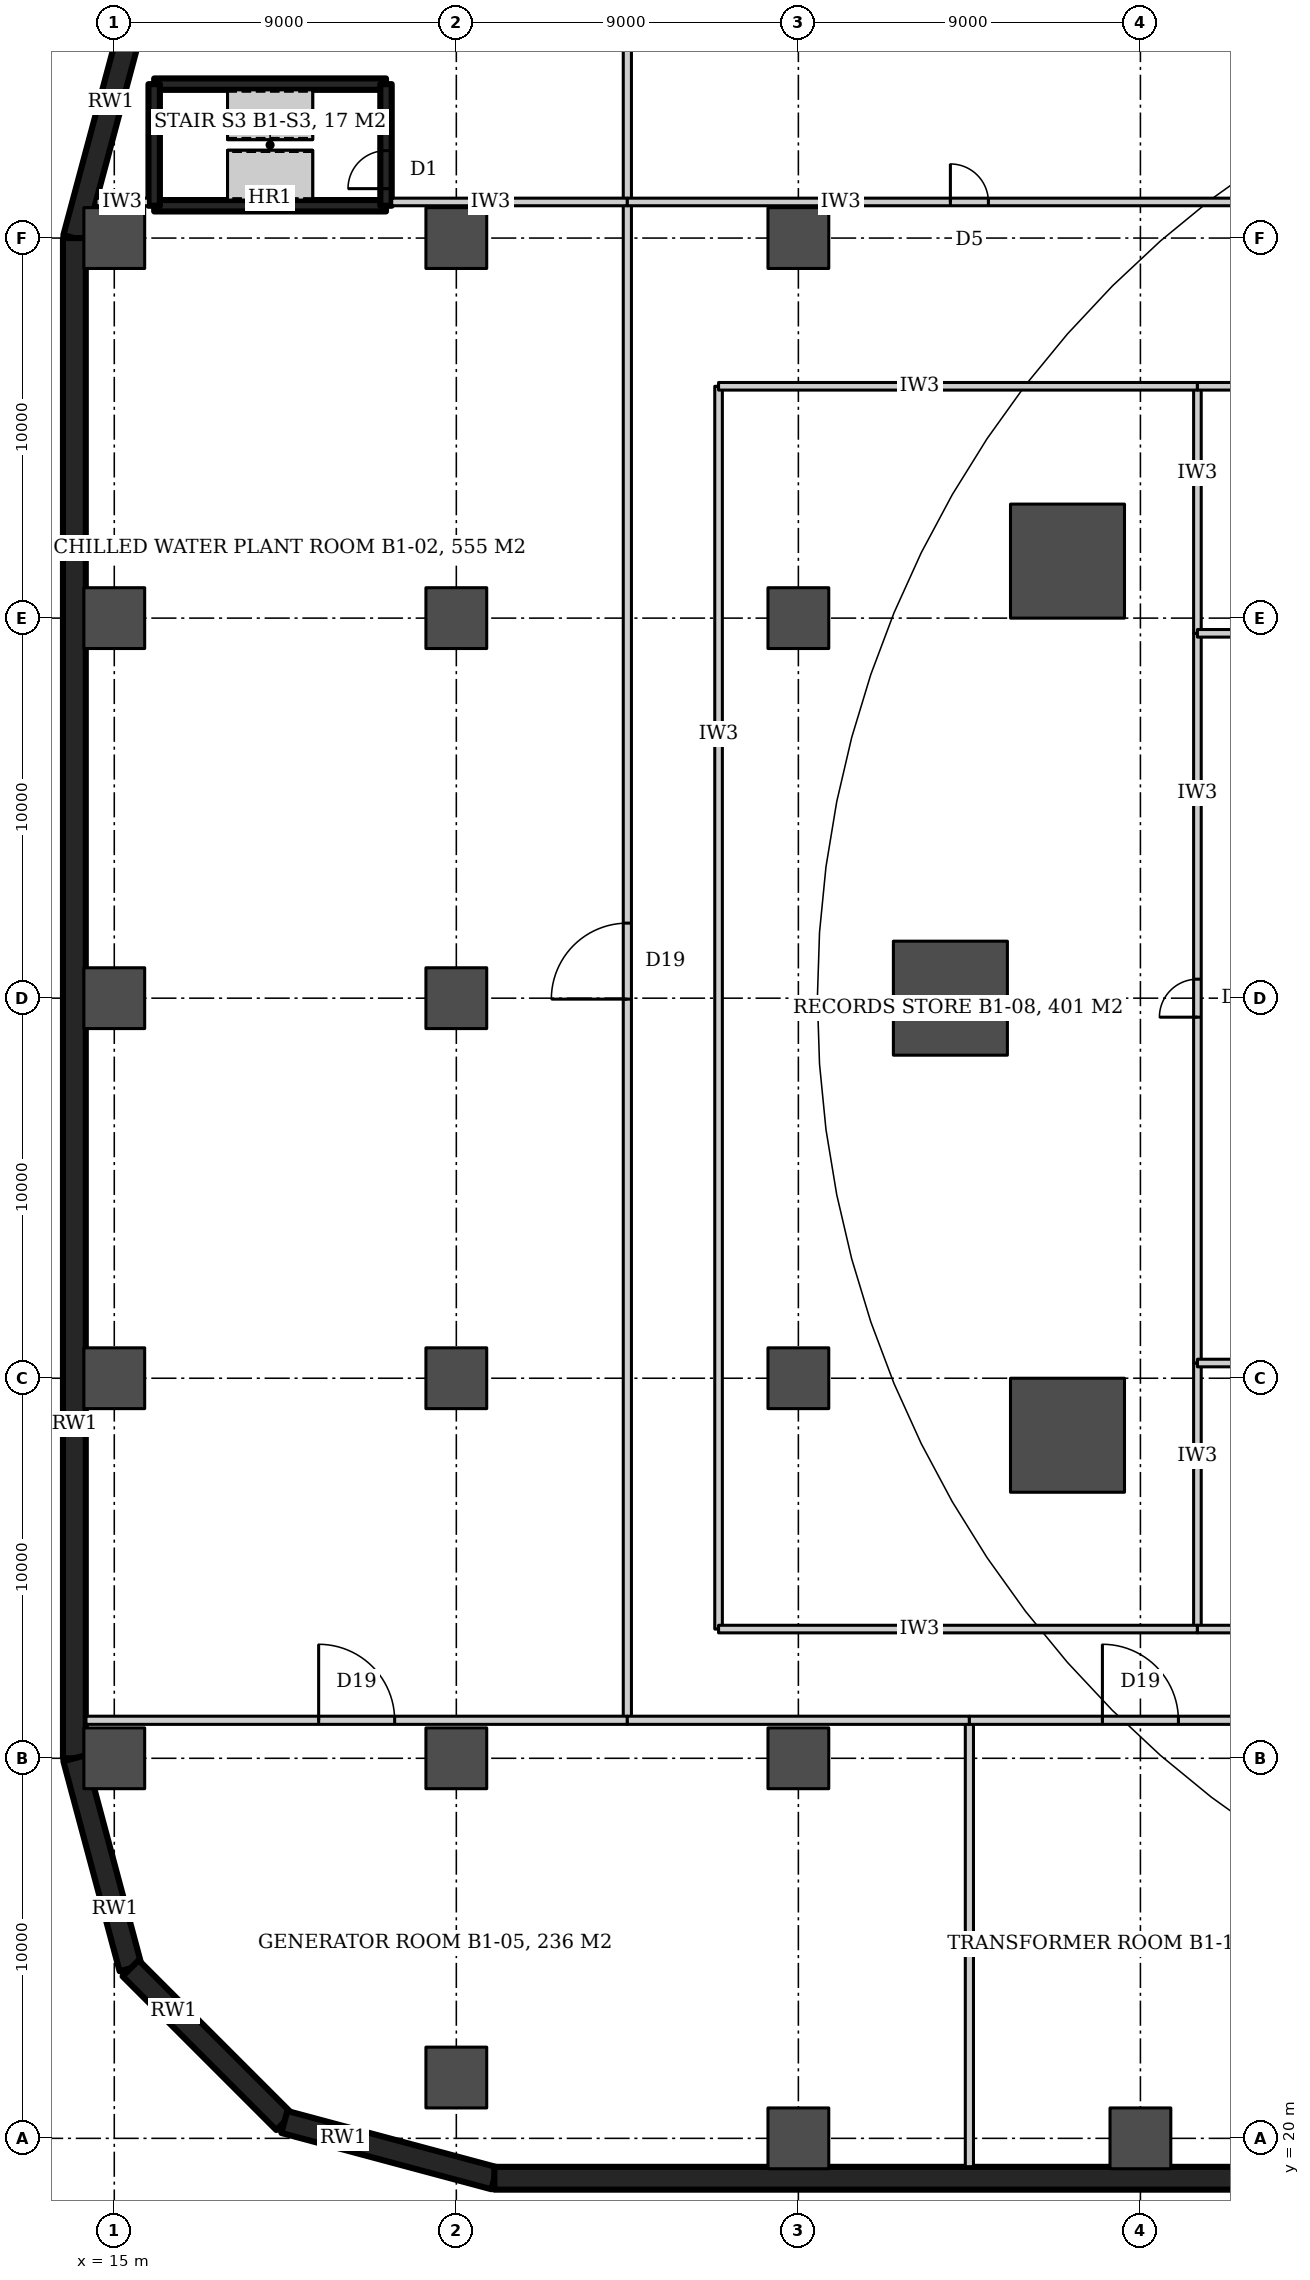
"""IFC4 building model, lengths in metres.
Left out: names, types, materials, properties, quantities, classifications, styles, units other than length and angle.
Written with IfcOpenShell. Run it as: python <this file> out.ifc"""

import sys

from ifc_helpers import new_model, si_unit, direction, frame, frame_2d, origin, origin_2d, place, context, subcontext, project, spatial, rectangle, circle, extrude, element, fill, save


model = new_model("IFC4")
c1 = context("Model", 3, precision=1e-05, world=origin(), true_north=direction((0.0, 1.0)))
c2 = subcontext(c1, "Body", "Model", "MODEL_VIEW")
j1 = project(units=[si_unit("LENGTHUNIT", "METRE"), si_unit("PLANEANGLEUNIT", "RADIAN")], contexts=[c1])
p1 = place(None, origin())
s1 = spatial("IfcSite", under=j1, at=p1, CompositionType="ELEMENT")
p2 = place(p1, origin())
s2 = spatial("IfcBuilding", under=s1, at=p2, CompositionType="ELEMENT")
p3 = place(p2, frame((0.0, 0.0, -6.0)))
s3 = spatial("IfcBuildingStorey", under=s2, at=p3, CompositionType="ELEMENT", Elevation=-6.0)
p4 = place(p3, frame((15.43, 75.525, -0.5), z_axis=(0.0, 0.0, 1.0), x_axis=(-0.258831381584, -0.965922520654, 0.0)))
e1 = element("IfcWall", 1, at=p4, inside=s3, PredefinedType="SOLIDWALL", context=c2, shape_type="SweptSolid", body=[
    extrude(rectangle(XDim=5.72, YDim=0.6, at=frame_2d((2.86, 0.0))), origin(), (0.0, 0.0, 1.0), 6.2),
])
p5 = place(p3, frame((13.95, 70.0, -0.5), z_axis=(0.0, 0.0, 1.0), x_axis=(0.0, -1.0, 0.0)))
e2 = element("IfcWall", 2, at=p5, inside=s3, PredefinedType="SOLIDWALL", context=c2, shape_type="SweptSolid", body=[
    extrude(rectangle(XDim=40.0, YDim=0.6, at=frame_2d((20.0, 0.0))), origin(), (0.0, 0.0, 1.0), 6.2),
])
p6 = place(p3, frame((13.95, 30.0, -0.5), z_axis=(0.0, 0.0, 1.0), x_axis=(0.258831381584, -0.965922520654, 0.0)))
e3 = element("IfcWall", 3, at=p6, inside=s3, PredefinedType="SOLIDWALL", context=c2, shape_type="SweptSolid", body=[
    extrude(rectangle(XDim=5.72, YDim=0.6, at=frame_2d((2.86, 0.0))), origin(), (0.0, 0.0, 1.0), 6.2),
])
p7 = place(p3, frame((15.43, 24.475, -0.5), z_axis=(0.0, 0.0, 1.0), x_axis=(0.707106781187, -0.707106781187, 0.0)))
e4 = element("IfcWall", 4, at=p7, inside=s3, PredefinedType="SOLIDWALL", context=c2, shape_type="SweptSolid", body=[
    extrude(rectangle(XDim=5.72, YDim=0.6, at=frame_2d((2.86, 0.0))), origin(), (0.0, 0.0, 1.0), 6.2),
])
p8 = place(p3, frame((19.475, 20.43, -0.5), z_axis=(0.0, 0.0, 1.0), x_axis=(0.965922520654, -0.258831381584, 0.0)))
e5 = element("IfcWall", 5, at=p8, inside=s3, PredefinedType="SOLIDWALL", context=c2, shape_type="SweptSolid", body=[
    extrude(rectangle(XDim=5.72, YDim=0.6, at=frame_2d((2.86, 0.0))), origin(), (0.0, 0.0, 1.0), 6.2),
])
p9 = place(p3, frame((25.0, 18.95, -0.5), z_axis=(0.0, 0.0, 1.0), x_axis=(1.0, 0.0, 0.0)))
e6 = element("IfcWall", 6, at=p9, inside=s3, PredefinedType="SOLIDWALL", context=c2, shape_type="SweptSolid", body=[
    extrude(rectangle(XDim=70.0, YDim=0.6, at=frame_2d((35.0, 0.0))), origin(), (0.0, 0.0, 1.0), 6.2),
])
for number, where, z_axis, x_axis in (
    (7, (33.0, 20.0, -0.5), (0.0, 0.0, 1.0), (1.0, 0.0, 0.0)),
    (8, (42.0, 20.0, -0.5), (0.0, 0.0, 1.0), (1.0, 0.0, 0.0)),
    (9, (24.0, 21.6, -0.5), (0.0, 0.0, 1.0), (1.0, 0.0, 0.0)),
    (10, (15.0, 30.0, -0.5), (0.0, 0.0, 1.0), (1.0, 0.0, 0.0)),
    (11, (24.0, 30.0, -0.5), (0.0, 0.0, 1.0), (1.0, 0.0, 0.0)),
    (12, (33.0, 30.0, -0.5), (0.0, 0.0, 1.0), (1.0, 0.0, 0.0)),
    (13, (15.0, 40.0, -0.5), (0.0, 0.0, 1.0), (1.0, 0.0, 0.0)),
    (14, (24.0, 40.0, -0.5), (0.0, 0.0, 1.0), (1.0, 0.0, 0.0)),
    (15, (33.0, 40.0, -0.5), (0.0, 0.0, 1.0), (1.0, 0.0, 0.0)),
    (16, (15.0, 50.0, -0.5), (0.0, 0.0, 1.0), (1.0, 0.0, 0.0)),
    (17, (24.0, 50.0, -0.5), (0.0, 0.0, 1.0), (1.0, 0.0, 0.0)),
    (18, (15.0, 60.0, -0.5), (0.0, 0.0, 1.0), (1.0, 0.0, 0.0)),
    (19, (24.0, 60.0, -0.5), (0.0, 0.0, 1.0), (1.0, 0.0, 0.0)),
    (20, (33.0, 60.0, -0.5), (0.0, 0.0, 1.0), (1.0, 0.0, 0.0)),
    (21, (15.0, 70.0, -0.5), (0.0, 0.0, 1.0), (1.0, 0.0, 0.0)),
    (22, (24.0, 70.0, -0.5), (0.0, 0.0, 1.0), (1.0, 0.0, 0.0)),
    (23, (33.0, 70.0, -0.5), (0.0, 0.0, 1.0), (1.0, 0.0, 0.0)),
):
    element("IfcColumn", number, at=place(p3, frame(where, z_axis=z_axis, x_axis=x_axis)), inside=s3, PredefinedType="COLUMN", context=c2, shape_type="SweptSolid", body=[
        extrude(rectangle(XDim=1.6, YDim=1.6, at=origin_2d()), origin(), (0.0, 0.0, 1.0), 6.5),
    ])
for number, where, z_axis, x_axis in (
    (24, (40.081, 61.5, 0.0), (0.0, 0.0, 1.0), (1.0, 0.0, 0.0)),
    (25, (37.0, 50.0, 0.0), (0.0, 0.0, 1.0), (1.0, 0.0, 0.0)),
    (26, (40.081, 38.5, 0.0), (0.0, 0.0, 1.0), (1.0, 0.0, 0.0)),
):
    element("IfcColumn", number, at=place(p3, frame(where, z_axis=z_axis, x_axis=x_axis)), inside=s3, PredefinedType="COLUMN", context=c2, shape_type="SweptSolid", body=[
        extrude(circle(Radius=1.5, at=origin_2d()), origin(), (0.0, 0.0, 1.0), 6.0),
    ])
p10 = place(p3, frame((28.5, 31.0, 0.0), z_axis=(0.0, 0.0, 1.0), x_axis=(0.0, 1.0, 0.0)))
e27 = element("IfcWall", 27, at=p10, inside=s3, PredefinedType="PARTITIONING", context=c2, shape_type="SweptSolid", body=[
    extrude(rectangle(XDim=39.95, YDim=0.215, at=frame_2d((19.975, 0.0))), origin(), (0.0, 0.0, 1.0), 3.68),
])
p11 = place(p10, frame((18.975, 0.0, 0.0)))
e28 = element("IfcOpeningElement", 28, at=p11, cuts=e27, PredefinedType="OPENING", context=c2, shape_type="SweptSolid", body=[
    extrude(rectangle(XDim=2.0, YDim=2.4, at=frame_2d((1.0, 1.2))), frame((0.0, 0.117, 0.0), z_axis=(0.0, -1.0, 0.0), x_axis=(1.0, 0.0, 0.0)), (0.0, 0.0, 1.0), 0.235),
])
p12 = place(p3, frame((28.5, 70.95, 0.0), z_axis=(0.0, 0.0, 1.0), x_axis=(0.0, 1.0, 0.0)))
e29 = element("IfcWall", 29, at=p12, inside=s3, PredefinedType="PARTITIONING", context=c2, shape_type="SweptSolid", body=[
    extrude(rectangle(XDim=9.795, YDim=0.215, at=frame_2d((4.897, 0.0))), origin(), (0.0, 0.0, 1.0), 3.68),
])
p13 = place(p3, frame((30.9, 33.4, 0.0), z_axis=(0.0, 0.0, 1.0), x_axis=(0.0, 1.0, 0.0)))
e30 = element("IfcWall", 30, at=p13, inside=s3, PredefinedType="PARTITIONING", context=c2, shape_type="SweptSolid", body=[
    extrude(rectangle(XDim=32.7, YDim=0.2, at=frame_2d((16.35, 0.0))), origin(), (0.0, 0.0, 1.0), 3.68),
])
p14 = place(p3, frame((37.5, 19.255, 0.0), z_axis=(0.0, 0.0, 1.0), x_axis=(0.0, 1.0, 0.0)))
e31 = element("IfcWall", 31, at=p14, inside=s3, PredefinedType="PARTITIONING", context=c2, shape_type="SweptSolid", body=[
    extrude(rectangle(XDim=11.745, YDim=0.215, at=frame_2d((5.873, 0.0))), origin(), (0.0, 0.0, 1.0), 3.68),
])
p15 = place(p3, frame((43.5, 33.4, 0.0), z_axis=(0.0, 0.0, 1.0), x_axis=(0.0, 1.0, 0.0)))
e32 = element("IfcWall", 32, at=p15, inside=s3, PredefinedType="PARTITIONING", context=c2, shape_type="SweptSolid", body=[
    extrude(rectangle(XDim=7.0, YDim=0.2, at=frame_2d((3.5, 0.0))), origin(), (0.0, 0.0, 1.0), 3.08),
])
p16 = place(p3, frame((43.5, 40.4, 0.0), z_axis=(0.0, 0.0, 1.0), x_axis=(0.0, 1.0, 0.0)))
e33 = element("IfcWall", 33, at=p16, inside=s3, PredefinedType="PARTITIONING", context=c2, shape_type="SweptSolid", body=[
    extrude(rectangle(XDim=19.2, YDim=0.2, at=frame_2d((9.6, 0.0))), origin(), (0.0, 0.0, 1.0), 3.08),
])
p17 = place(p16, frame((9.1, 0.0, 0.0)))
e34 = element("IfcOpeningElement", 34, at=p17, cuts=e33, PredefinedType="OPENING", context=c2, shape_type="SweptSolid", body=[
    extrude(rectangle(XDim=1.0, YDim=2.1, at=frame_2d((0.5, 1.05))), frame((0.0, 0.11, 0.0), z_axis=(0.0, -1.0, 0.0), x_axis=(1.0, 0.0, 0.0)), (0.0, 0.0, 1.0), 0.22),
])
p18 = place(p3, frame((43.5, 59.6, 0.0), z_axis=(0.0, 0.0, 1.0), x_axis=(0.0, 1.0, 0.0)))
e35 = element("IfcWall", 35, at=p18, inside=s3, PredefinedType="PARTITIONING", context=c2, shape_type="SweptSolid", body=[
    extrude(rectangle(XDim=6.5, YDim=0.2, at=frame_2d((3.25, 0.0))), origin(), (0.0, 0.0, 1.0), 3.08),
])
p19 = place(p3, frame((14.255, 31.0, 0.0), z_axis=(0.0, 0.0, 1.0), x_axis=(1.0, 0.0, 0.0)))
e36 = element("IfcWall", 36, at=p19, inside=s3, PredefinedType="PARTITIONING", context=c2, shape_type="SweptSolid", body=[
    extrude(rectangle(XDim=14.245, YDim=0.215, at=frame_2d((7.123, 0.0))), origin(), (0.0, 0.0, 1.0), 3.68),
])
p20 = place(p19, frame((6.123, 0.0, 0.0)))
e37 = element("IfcOpeningElement", 37, at=p20, cuts=e36, PredefinedType="OPENING", context=c2, shape_type="SweptSolid", body=[
    extrude(rectangle(XDim=2.0, YDim=2.4, at=frame_2d((1.0, 1.2))), frame((0.0, 0.117, 0.0), z_axis=(0.0, -1.0, 0.0), x_axis=(1.0, 0.0, 0.0)), (0.0, 0.0, 1.0), 0.235),
])
p21 = place(p3, frame((28.5, 31.0, 0.0), z_axis=(0.0, 0.0, 1.0), x_axis=(1.0, 0.0, 0.0)))
e38 = element("IfcWall", 38, at=p21, inside=s3, PredefinedType="PARTITIONING", context=c2, shape_type="SweptSolid", body=[
    extrude(rectangle(XDim=9.0, YDim=0.215, at=frame_2d((4.5, 0.0))), origin(), (0.0, 0.0, 1.0), 3.68),
])
p22 = place(p3, frame((37.5, 31.0, 0.0), z_axis=(0.0, 0.0, 1.0), x_axis=(1.0, 0.0, 0.0)))
e39 = element("IfcWall", 39, at=p22, inside=s3, PredefinedType="PARTITIONING", context=c2, shape_type="SweptSolid", body=[
    extrude(rectangle(XDim=9.0, YDim=0.215, at=frame_2d((4.5, 0.0))), origin(), (0.0, 0.0, 1.0), 3.68),
])
p23 = place(p22, frame((3.5, 0.0, 0.0)))
e40 = element("IfcOpeningElement", 40, at=p23, cuts=e39, PredefinedType="OPENING", context=c2, shape_type="SweptSolid", body=[
    extrude(rectangle(XDim=2.0, YDim=2.4, at=frame_2d((1.0, 1.2))), frame((0.0, 0.117, 0.0), z_axis=(0.0, -1.0, 0.0), x_axis=(1.0, 0.0, 0.0)), (0.0, 0.0, 1.0), 0.235),
])
p24 = place(p3, frame((30.9, 33.4, 0.0), z_axis=(0.0, 0.0, 1.0), x_axis=(1.0, 0.0, 0.0)))
e41 = element("IfcWall", 41, at=p24, inside=s3, PredefinedType="PARTITIONING", context=c2, shape_type="SweptSolid", body=[
    extrude(rectangle(XDim=12.6, YDim=0.2, at=frame_2d((6.3, 0.0))), origin(), (0.0, 0.0, 1.0), 3.68),
])
p25 = place(p3, frame((43.5, 33.4, 0.0), z_axis=(0.0, 0.0, 1.0), x_axis=(1.0, 0.0, 0.0)))
e42 = element("IfcWall", 42, at=p25, inside=s3, PredefinedType="PARTITIONING", context=c2, shape_type="SweptSolid", body=[
    extrude(rectangle(XDim=18.55, YDim=0.2, at=frame_2d((9.275, 0.0))), origin(), (0.0, 0.0, 1.0), 3.08),
])
p26 = place(p25, frame((8.775, 0.0, 0.0)))
e43 = element("IfcOpeningElement", 43, at=p26, cuts=e42, PredefinedType="OPENING", context=c2, shape_type="SweptSolid", body=[
    extrude(rectangle(XDim=1.0, YDim=2.1, at=frame_2d((0.5, 1.05))), frame((0.0, 0.11, 0.0), z_axis=(0.0, -1.0, 0.0), x_axis=(1.0, 0.0, 0.0)), (0.0, 0.0, 1.0), 0.22),
])
for number, where, z_axis, x_axis in (
    (44, (43.5, 40.4, 0.0), (0.0, 0.0, 1.0), (1.0, 0.0, 0.0)),
    (45, (43.5, 59.6, 0.0), (0.0, 0.0, 1.0), (1.0, 0.0, 0.0)),
):
    element("IfcWall", number, at=place(p3, frame(where, z_axis=z_axis, x_axis=x_axis)), inside=s3, PredefinedType="PARTITIONING", context=c2, shape_type="SweptSolid", body=[
        extrude(rectangle(XDim=18.55, YDim=0.2, at=frame_2d((9.275, 0.0))), origin(), (0.0, 0.0, 1.0), 2.48),
    ])
p27 = place(p3, frame((30.9, 66.1, 0.0), z_axis=(0.0, 0.0, 1.0), x_axis=(1.0, 0.0, 0.0)))
e46 = element("IfcWall", 46, at=p27, inside=s3, PredefinedType="PARTITIONING", context=c2, shape_type="SweptSolid", body=[
    extrude(rectangle(XDim=12.6, YDim=0.2, at=frame_2d((6.3, 0.0))), origin(), (0.0, 0.0, 1.0), 3.68),
])
p28 = place(p3, frame((43.5, 66.1, 0.0), z_axis=(0.0, 0.0, 1.0), x_axis=(1.0, 0.0, 0.0)))
e47 = element("IfcWall", 47, at=p28, inside=s3, PredefinedType="PARTITIONING", context=c2, shape_type="SweptSolid", body=[
    extrude(rectangle(XDim=18.55, YDim=0.2, at=frame_2d((9.275, 0.0))), origin(), (0.0, 0.0, 1.0), 3.08),
])
p29 = place(p28, frame((8.075, 0.0, 0.0)))
e48 = element("IfcOpeningElement", 48, at=p29, cuts=e47, PredefinedType="OPENING", context=c2, shape_type="SweptSolid", body=[
    extrude(rectangle(XDim=2.4, YDim=2.7, at=frame_2d((1.2, 1.35))), frame((0.0, 0.11, 0.0), z_axis=(0.0, -1.0, 0.0), x_axis=(1.0, 0.0, 0.0)), (0.0, 0.0, 1.0), 0.22),
])
p30 = place(p3, frame((14.52, 70.95, 0.0), z_axis=(0.0, 0.0, 1.0), x_axis=(1.0, 0.0, 0.0)))
e49 = element("IfcWall", 49, at=p30, inside=s3, PredefinedType="PARTITIONING", context=c2, shape_type="SweptSolid", body=[
    extrude(rectangle(XDim=1.38, YDim=0.2, at=frame_2d((0.69, 0.0))), origin(), (0.0, 0.0, 1.0), 4.1),
])
p31 = place(p3, frame((22.3, 70.95, 0.0), z_axis=(0.0, 0.0, 1.0), x_axis=(1.0, 0.0, 0.0)))
e50 = element("IfcWall", 50, at=p31, inside=s3, PredefinedType="PARTITIONING", context=c2, shape_type="SweptSolid", body=[
    extrude(rectangle(XDim=6.2, YDim=0.2, at=frame_2d((3.1, 0.0))), origin(), (0.0, 0.0, 1.0), 4.1),
])
p32 = place(p3, frame((28.5, 70.95, 0.0), z_axis=(0.0, 0.0, 1.0), x_axis=(1.0, 0.0, 0.0)))
e51 = element("IfcWall", 51, at=p32, inside=s3, PredefinedType="PARTITIONING", context=c2, shape_type="SweptSolid", body=[
    extrude(rectangle(XDim=18.0, YDim=0.2, at=frame_2d((9.0, 0.0))), origin(), (0.0, 0.0, 1.0), 3.68),
])
p33 = place(p32, frame((8.5, 0.0, 0.0)))
e52 = element("IfcOpeningElement", 52, at=p33, cuts=e51, PredefinedType="OPENING", context=c2, shape_type="SweptSolid", body=[
    extrude(rectangle(XDim=1.0, YDim=2.1, at=frame_2d((0.5, 1.05))), frame((0.0, 0.11, 0.0), z_axis=(0.0, -1.0, 0.0), x_axis=(1.0, 0.0, 0.0)), (0.0, 0.0, 1.0), 0.22),
])
for number, where, z_axis, x_axis in (
    (53, (16.05, 70.85, 0.0), (0.0, 0.0, 1.0), (1.0, 0.0, 0.0)),
    (54, (16.05, 74.05, 0.0), (0.0, 0.0, 1.0), (1.0, 0.0, 0.0)),
):
    element("IfcWall", number, at=place(p3, frame(where, z_axis=z_axis, x_axis=x_axis)), inside=s3, PredefinedType="SHEAR", context=c2, shape_type="SweptSolid", body=[
        extrude(rectangle(XDim=6.1, YDim=0.3, at=frame_2d((3.05, 0.0))), origin(), (0.0, 0.0, 1.0), 6.0),
    ])
p34 = place(p3, frame((16.05, 70.85, 0.0), z_axis=(0.0, 0.0, 1.0), x_axis=(0.0, 1.0, 0.0)))
e55 = element("IfcWall", 55, at=p34, inside=s3, PredefinedType="SHEAR", context=c2, shape_type="SweptSolid", body=[
    extrude(rectangle(XDim=3.2, YDim=0.3, at=frame_2d((1.6, 0.0))), origin(), (0.0, 0.0, 1.0), 6.0),
])
p35 = place(p3, frame((22.15, 70.85, 0.0), z_axis=(0.0, 0.0, 1.0), x_axis=(0.0, 1.0, 0.0)))
e56 = element("IfcWall", 56, at=p35, inside=s3, PredefinedType="SHEAR", context=c2, shape_type="SweptSolid", body=[
    extrude(rectangle(XDim=3.2, YDim=0.3, at=frame_2d((1.6, 0.0))), origin(), (0.0, 0.0, 1.0), 6.0),
])
p36 = place(p35, frame((0.45, 0.0, 0.0)))
e57 = element("IfcOpeningElement", 57, at=p36, cuts=e56, PredefinedType="OPENING", context=c2, shape_type="SweptSolid", body=[
    extrude(rectangle(XDim=1.0, YDim=2.1, at=frame_2d((0.5, 1.05))), frame((0.0, 0.16, 0.0), z_axis=(0.0, -1.0, 0.0), x_axis=(1.0, 0.0, 0.0)), (0.0, 0.0, 1.0), 0.32),
])
p37 = place(p20, origin())
e58 = element("IfcDoor", 58, at=p37, inside=s3, OperationType="DOUBLE_DOOR_DOUBLE_SWING", PredefinedType="DOOR", context=c2, shape_type="SweptSolid", body=[
    extrude(rectangle(XDim=2.0, YDim=2.4, at=frame_2d((1.0, 1.2))), frame((0.0, 0.025, 0.0), z_axis=(0.0, -1.0, 0.0), x_axis=(1.0, 0.0, 0.0)), (0.0, 0.0, 1.0), 0.05),
])
fill(e37, e58)
p38 = place(p23, origin())
e59 = element("IfcDoor", 59, at=p38, inside=s3, OperationType="DOUBLE_DOOR_DOUBLE_SWING", PredefinedType="DOOR", context=c2, shape_type="SweptSolid", body=[
    extrude(rectangle(XDim=2.0, YDim=2.4, at=frame_2d((1.0, 1.2))), frame((0.0, 0.025, 0.0), z_axis=(0.0, -1.0, 0.0), x_axis=(1.0, 0.0, 0.0)), (0.0, 0.0, 1.0), 0.05),
])
fill(e40, e59)
p39 = place(p11, origin())
e60 = element("IfcDoor", 60, at=p39, inside=s3, OperationType="DOUBLE_DOOR_DOUBLE_SWING", PredefinedType="DOOR", context=c2, shape_type="SweptSolid", body=[
    extrude(rectangle(XDim=2.0, YDim=2.4, at=frame_2d((1.0, 1.2))), frame((0.0, 0.025, 0.0), z_axis=(0.0, -1.0, 0.0), x_axis=(1.0, 0.0, 0.0)), (0.0, 0.0, 1.0), 0.05),
])
fill(e28, e60)
p40 = place(p33, origin())
e61 = element("IfcDoor", 61, at=p40, inside=s3, OperationType="SINGLE_SWING_LEFT", PredefinedType="DOOR", context=c2, shape_type="SweptSolid", body=[
    extrude(rectangle(XDim=1.0, YDim=2.1, at=frame_2d((0.5, 1.05))), frame((0.0, 0.025, 0.0), z_axis=(0.0, -1.0, 0.0), x_axis=(1.0, 0.0, 0.0)), (0.0, 0.0, 1.0), 0.05),
])
fill(e52, e61)
p41 = place(p17, origin())
e62 = element("IfcDoor", 62, at=p41, inside=s3, OperationType="SINGLE_SWING_LEFT", PredefinedType="DOOR", context=c2, shape_type="SweptSolid", body=[
    extrude(rectangle(XDim=1.0, YDim=2.1, at=frame_2d((0.5, 1.05))), frame((0.0, 0.025, 0.0), z_axis=(0.0, -1.0, 0.0), x_axis=(1.0, 0.0, 0.0)), (0.0, 0.0, 1.0), 0.05),
])
fill(e34, e62)
p42 = place(p36, origin())
e63 = element("IfcDoor", 63, at=p42, inside=s3, OperationType="SINGLE_SWING_LEFT", PredefinedType="DOOR", context=c2, shape_type="SweptSolid", body=[
    extrude(rectangle(XDim=1.0, YDim=2.1, at=frame_2d((0.5, 1.05))), frame((0.0, 0.025, 0.0), z_axis=(0.0, -1.0, 0.0), x_axis=(1.0, 0.0, 0.0)), (0.0, 0.0, 1.0), 0.05),
])
fill(e57, e63)
save(model, sys.argv[1])
